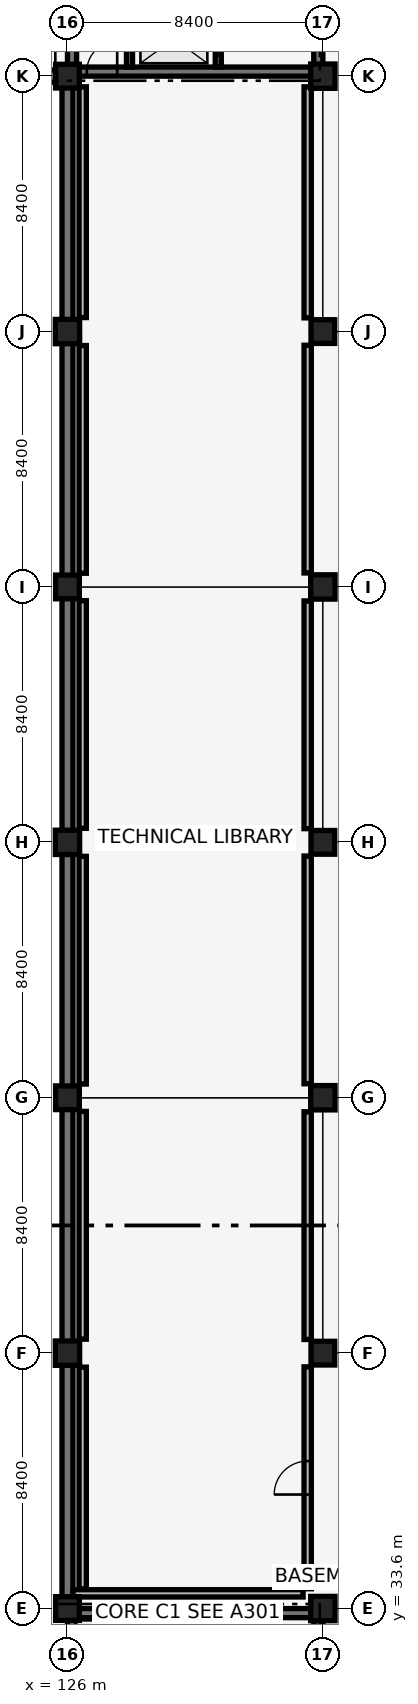
"""IFC4 building model, lengths in metres.
Left out: names, types, materials, properties, quantities, classifications, styles, units other than length and angle.
Written with IfcOpenShell. Run it as: python <this file> out.ifc"""

import sys

from ifc_helpers import new_model, si_unit, direction, frame, frame_2d, origin, origin_2d, place, context, subcontext, project, spatial, rectangle, extrude, element, fill, save


model = new_model("IFC4")
c1 = context("Model", 3, precision=1e-05, world=origin(), true_north=direction((0.0, 1.0)))
c2 = subcontext(c1, "Body", "Model", "MODEL_VIEW")
j1 = project(units=[si_unit("LENGTHUNIT", "METRE"), si_unit("PLANEANGLEUNIT", "RADIAN")], contexts=[c1])
p1 = place(None, origin())
s1 = spatial("IfcSite", under=j1, at=p1, CompositionType="ELEMENT")
p2 = place(p1, origin())
s2 = spatial("IfcBuilding", under=s1, at=p2, CompositionType="ELEMENT")
p3 = place(p2, frame((0.0, 0.0, -4.42)))
s3 = spatial("IfcBuildingStorey", under=s2, at=p3, CompositionType="ELEMENT", Elevation=-4.42)
p4 = place(p3, frame((117.95, 84.0, 0.0), z_axis=(0.0, 0.0, 1.0), x_axis=(1.0, 0.0, 0.0)))
e1 = element("IfcWall", 1, at=p4, inside=s3, PredefinedType="USERDEFINED", context=c2, shape_type="SweptSolid", body=[
    extrude(rectangle(XDim=7.7, YDim=0.4, at=frame_2d((3.85, 0.0))), origin(), (0.0, 0.0, 1.0), 4.12),
])
for number, where, z_axis, x_axis in (
    (2, (126.0, 33.95, 0.0), (0.0, 0.0, 1.0), (0.0, 1.0, 0.0)),
    (3, (126.0, 42.35, 0.0), (0.0, 0.0, 1.0), (0.0, 1.0, 0.0)),
    (4, (126.0, 50.75, 0.0), (0.0, 0.0, 1.0), (0.0, 1.0, 0.0)),
):
    element("IfcWall", number, at=place(p3, frame(where, z_axis=z_axis, x_axis=x_axis)), inside=s3, PredefinedType="USERDEFINED", context=c2, shape_type="SweptSolid", body=[
        extrude(rectangle(XDim=7.7, YDim=0.36, at=frame_2d((3.85, 0.0))), origin(), (0.0, 0.0, 1.0), 4.12),
    ])
p5 = place(p3, frame((126.0, 59.15, 0.0), z_axis=(0.0, 0.0, 1.0), x_axis=(0.0, 1.0, 0.0)))
e5 = element("IfcWall", 5, at=p5, inside=s3, PredefinedType="USERDEFINED", context=c2, shape_type="SweptSolid", body=[
    extrude(rectangle(XDim=7.7, YDim=0.36, at=frame_2d((3.85, 0.0))), origin(), (0.0, 0.0, 1.0), 4.12),
])
for number, where, z_axis, x_axis in (
    (6, (126.0, 67.55, 0.0), (0.0, 0.0, 1.0), (0.0, 1.0, 0.0)),
    (7, (126.0, 75.95, 0.0), (0.0, 0.0, 1.0), (0.0, 1.0, 0.0)),
):
    element("IfcWall", number, at=place(p3, frame(where, z_axis=z_axis, x_axis=x_axis)), inside=s3, PredefinedType="USERDEFINED", context=c2, shape_type="SweptSolid", body=[
        extrude(rectangle(XDim=7.7, YDim=0.36, at=frame_2d((3.85, 0.0))), origin(), (0.0, 0.0, 1.0), 4.12),
    ])
p6 = place(p3, frame((126.15, 33.45, 0.0), z_axis=(0.0, 0.0, 1.0), x_axis=(1.0, 0.0, 0.0)))
e8 = element("IfcWall", 8, at=p6, inside=s3, PredefinedType="SHEAR", context=c2, shape_type="SweptSolid", body=[
    extrude(rectangle(XDim=8.1, YDim=0.3, at=frame_2d((4.05, 0.0))), origin(), (0.0, 0.0, 1.0), 4.12),
])
p7 = place(p3, frame((126.15, 25.35, 0.0), z_axis=(0.0, 0.0, 1.0), x_axis=(0.0, 1.0, 0.0)))
e9 = element("IfcWall", 9, at=p7, inside=s3, PredefinedType="SHEAR", context=c2, shape_type="SweptSolid", body=[
    extrude(rectangle(XDim=8.1, YDim=0.3, at=frame_2d((4.05, 0.0))), origin(), (0.0, 0.0, 1.0), 4.12),
])
p8 = place(p3, frame((134.25, 25.35, 0.0), z_axis=(0.0, 0.0, 1.0), x_axis=(0.0, 1.0, 0.0)))
e10 = element("IfcWall", 10, at=p8, inside=s3, PredefinedType="SHEAR", context=c2, shape_type="SweptSolid", body=[
    extrude(rectangle(XDim=8.1, YDim=0.3, at=frame_2d((4.05, 0.0))), origin(), (0.0, 0.0, 1.0), 4.12),
])
p9 = place(p8, frame((1.325, 0.0, 0.0)))
e11 = element("IfcOpeningElement", 11, at=p9, cuts=e10, PredefinedType="OPENING", context=c2, shape_type="SweptSolid", body=[
    extrude(rectangle(XDim=1.45, YDim=2.15, at=frame_2d((0.725, 1.075))), frame((0.0, 0.16, 0.0), z_axis=(0.0, -1.0, 0.0), x_axis=(1.0, 0.0, 0.0)), (0.0, 0.0, 1.0), 0.32),
])
p10 = place(p3, frame((126.15, 84.15, 0.0), z_axis=(0.0, 0.0, 1.0), x_axis=(1.0, 0.0, 0.0)))
e12 = element("IfcWall", 12, at=p10, inside=s3, PredefinedType="SHEAR", context=c2, shape_type="SweptSolid", body=[
    extrude(rectangle(XDim=8.1, YDim=0.3, at=frame_2d((4.05, 0.0))), origin(), (0.0, 0.0, 1.0), 4.12),
])
p11 = place(p10, frame((0.485, 0.0, 0.0)))
e13 = element("IfcOpeningElement", 13, at=p11, cuts=e12, PredefinedType="OPENING", context=c2, shape_type="SweptSolid", body=[
    extrude(rectangle(XDim=1.0, YDim=2.15, at=frame_2d((0.5, 1.075))), frame((0.0, 0.16, 0.0), z_axis=(0.0, -1.0, 0.0), x_axis=(1.0, 0.0, 0.0)), (0.0, 0.0, 1.0), 0.32),
])
p12 = place(p3, frame((126.15, 84.15, 0.0), z_axis=(0.0, 0.0, 1.0), x_axis=(0.0, 1.0, 0.0)))
e14 = element("IfcWall", 14, at=p12, inside=s3, PredefinedType="SHEAR", context=c2, shape_type="SweptSolid", body=[
    extrude(rectangle(XDim=8.1, YDim=0.3, at=frame_2d((4.05, 0.0))), origin(), (0.0, 0.0, 1.0), 4.12),
])
p13 = place(p3, frame((134.25, 84.15, 0.0), z_axis=(0.0, 0.0, 1.0), x_axis=(0.0, 1.0, 0.0)))
e15 = element("IfcWall", 15, at=p13, inside=s3, PredefinedType="SHEAR", context=c2, shape_type="SweptSolid", body=[
    extrude(rectangle(XDim=8.1, YDim=0.3, at=frame_2d((4.05, 0.0))), origin(), (0.0, 0.0, 1.0), 4.12),
])
p14 = place(p13, frame((1.325, 0.0, 0.0)))
e16 = element("IfcOpeningElement", 16, at=p14, cuts=e15, PredefinedType="OPENING", context=c2, shape_type="SweptSolid", body=[
    extrude(rectangle(XDim=1.45, YDim=2.15, at=frame_2d((0.725, 1.075))), frame((0.0, 0.16, 0.0), z_axis=(0.0, -1.0, 0.0), x_axis=(1.0, 0.0, 0.0)), (0.0, 0.0, 1.0), 0.32),
])
p15 = place(p3, frame((126.0, 33.6, -0.4), z_axis=(0.0, 0.0, 1.0), x_axis=(1.0, 0.0, 0.0)))
e17 = element("IfcColumn", 17, at=p15, inside=s3, PredefinedType="COLUMN", context=c2, shape_type="SweptSolid", body=[
    extrude(rectangle(XDim=0.78, YDim=0.78, at=origin_2d()), origin(), (0.0, 0.0, 1.0), 4.52),
])
p16 = place(p3, frame((126.0, 42.0, -0.4), z_axis=(0.0, 0.0, 1.0), x_axis=(1.0, 0.0, 0.0)))
e18 = element("IfcColumn", 18, at=p16, inside=s3, PredefinedType="COLUMN", context=c2, shape_type="SweptSolid", body=[
    extrude(rectangle(XDim=0.8, YDim=0.8, at=origin_2d()), origin(), (0.0, 0.0, 1.0), 4.52),
])
p17 = place(p3, frame((126.0, 50.4, -0.4), z_axis=(0.0, 0.0, 1.0), x_axis=(1.0, 0.0, 0.0)))
e19 = element("IfcColumn", 19, at=p17, inside=s3, PredefinedType="COLUMN", context=c2, shape_type="SweptSolid", body=[
    extrude(rectangle(XDim=0.78, YDim=0.78, at=origin_2d()), origin(), (0.0, 0.0, 1.0), 4.52),
])
p18 = place(p3, frame((126.0, 58.8, -0.4), z_axis=(0.0, 0.0, 1.0), x_axis=(1.0, 0.0, 0.0)))
e20 = element("IfcColumn", 20, at=p18, inside=s3, PredefinedType="COLUMN", context=c2, shape_type="SweptSolid", body=[
    extrude(rectangle(XDim=0.8, YDim=0.8, at=origin_2d()), origin(), (0.0, 0.0, 1.0), 4.52),
])
p19 = place(p3, frame((126.0, 67.2, -0.4), z_axis=(0.0, 0.0, 1.0), x_axis=(1.0, 0.0, 0.0)))
e21 = element("IfcColumn", 21, at=p19, inside=s3, PredefinedType="COLUMN", context=c2, shape_type="SweptSolid", body=[
    extrude(rectangle(XDim=0.78, YDim=0.78, at=origin_2d()), origin(), (0.0, 0.0, 1.0), 4.52),
])
p20 = place(p3, frame((126.0, 75.6, -0.4), z_axis=(0.0, 0.0, 1.0), x_axis=(1.0, 0.0, 0.0)))
e22 = element("IfcColumn", 22, at=p20, inside=s3, PredefinedType="COLUMN", context=c2, shape_type="SweptSolid", body=[
    extrude(rectangle(XDim=0.8, YDim=0.8, at=origin_2d()), origin(), (0.0, 0.0, 1.0), 4.52),
])
p21 = place(p3, frame((126.0, 84.0, -0.4), z_axis=(0.0, 0.0, 1.0), x_axis=(1.0, 0.0, 0.0)))
e23 = element("IfcColumn", 23, at=p21, inside=s3, PredefinedType="COLUMN", context=c2, shape_type="SweptSolid", body=[
    extrude(rectangle(XDim=0.78, YDim=0.78, at=origin_2d()), origin(), (0.0, 0.0, 1.0), 4.52),
])
p22 = place(p3, frame((134.4, 33.6, -0.4), z_axis=(0.0, 0.0, 1.0), x_axis=(1.0, 0.0, 0.0)))
e24 = element("IfcColumn", 24, at=p22, inside=s3, PredefinedType="COLUMN", context=c2, shape_type="SweptSolid", body=[
    extrude(rectangle(XDim=0.8, YDim=0.8, at=origin_2d()), origin(), (0.0, 0.0, 1.0), 4.52),
])
p23 = place(p3, frame((134.4, 42.0, -0.4), z_axis=(0.0, 0.0, 1.0), x_axis=(1.0, 0.0, 0.0)))
e25 = element("IfcColumn", 25, at=p23, inside=s3, PredefinedType="COLUMN", context=c2, shape_type="SweptSolid", body=[
    extrude(rectangle(XDim=0.78, YDim=0.78, at=origin_2d()), origin(), (0.0, 0.0, 1.0), 4.52),
])
p24 = place(p3, frame((134.4, 50.4, -0.4), z_axis=(0.0, 0.0, 1.0), x_axis=(1.0, 0.0, 0.0)))
e26 = element("IfcColumn", 26, at=p24, inside=s3, PredefinedType="COLUMN", context=c2, shape_type="SweptSolid", body=[
    extrude(rectangle(XDim=0.8, YDim=0.8, at=origin_2d()), origin(), (0.0, 0.0, 1.0), 4.52),
])
p25 = place(p3, frame((134.4, 58.8, -0.4), z_axis=(0.0, 0.0, 1.0), x_axis=(1.0, 0.0, 0.0)))
e27 = element("IfcColumn", 27, at=p25, inside=s3, PredefinedType="COLUMN", context=c2, shape_type="SweptSolid", body=[
    extrude(rectangle(XDim=0.78, YDim=0.78, at=origin_2d()), origin(), (0.0, 0.0, 1.0), 4.52),
])
p26 = place(p3, frame((134.4, 67.2, -0.4), z_axis=(0.0, 0.0, 1.0), x_axis=(1.0, 0.0, 0.0)))
e28 = element("IfcColumn", 28, at=p26, inside=s3, PredefinedType="COLUMN", context=c2, shape_type="SweptSolid", body=[
    extrude(rectangle(XDim=0.8, YDim=0.8, at=origin_2d()), origin(), (0.0, 0.0, 1.0), 4.52),
])
p27 = place(p3, frame((134.4, 75.6, -0.4), z_axis=(0.0, 0.0, 1.0), x_axis=(1.0, 0.0, 0.0)))
e29 = element("IfcColumn", 29, at=p27, inside=s3, PredefinedType="COLUMN", context=c2, shape_type="SweptSolid", body=[
    extrude(rectangle(XDim=0.78, YDim=0.78, at=origin_2d()), origin(), (0.0, 0.0, 1.0), 4.52),
])
p28 = place(p3, frame((134.4, 84.0, -0.4), z_axis=(0.0, 0.0, 1.0), x_axis=(1.0, 0.0, 0.0)))
e30 = element("IfcColumn", 30, at=p28, inside=s3, PredefinedType="COLUMN", context=c2, shape_type="SweptSolid", body=[
    extrude(rectangle(XDim=0.8, YDim=0.8, at=origin_2d()), origin(), (0.0, 0.0, 1.0), 4.52),
])
p29 = place(p3, frame((130.96, 84.3, 0.0), z_axis=(0.0, 0.0, 1.0), x_axis=(0.0, 1.0, 0.0)))
e31 = element("IfcWall", 31, at=p29, inside=s3, PredefinedType="SHEAR", context=c2, shape_type="SweptSolid", body=[
    extrude(rectangle(XDim=3.8, YDim=0.2, at=frame_2d((1.9, 0.0))), origin(), (0.0, 0.0, 1.0), 3.17),
])
p30 = place(p29, frame((0.375, 0.0, 0.0)))
e32 = element("IfcOpeningElement", 32, at=p30, cuts=e31, PredefinedType="OPENING", context=c2, shape_type="SweptSolid", body=[
    extrude(rectangle(XDim=1.1, YDim=2.15, at=frame_2d((0.55, 1.075))), frame((0.0, 0.11, 0.0), z_axis=(0.0, -1.0, 0.0), x_axis=(1.0, 0.0, 0.0)), (0.0, 0.0, 1.0), 0.22),
])
p31 = place(p29, frame((2.175, 0.0, 0.0)))
e33 = element("IfcOpeningElement", 33, at=p31, cuts=e31, PredefinedType="OPENING", context=c2, shape_type="SweptSolid", body=[
    extrude(rectangle(XDim=1.4, YDim=2.2, at=frame_2d((0.7, 1.1))), frame((0.0, 0.11, 0.0), z_axis=(0.0, -1.0, 0.0), x_axis=(1.0, 0.0, 0.0)), (0.0, 0.0, 1.0), 0.22),
])
p32 = place(p3, frame((128.04, 84.3, 0.0), z_axis=(0.0, 0.0, 1.0), x_axis=(0.0, 1.0, 0.0)))
e34 = element("IfcWall", 34, at=p32, inside=s3, PredefinedType="SHEAR", context=c2, shape_type="SweptSolid", body=[
    extrude(rectangle(XDim=3.8, YDim=0.2, at=frame_2d((1.9, 0.0))), origin(), (0.0, 0.0, 1.0), 3.17),
])
p33 = place(p3, frame((133.9, 34.25, 0.0), z_axis=(0.0, 0.0, 1.0), x_axis=(0.0, 1.0, 0.0)))
e35 = element("IfcWall", 35, at=p33, inside=s3, PredefinedType="PARTITIONING", context=c2, shape_type="SweptSolid", body=[
    extrude(rectangle(XDim=7.3, YDim=0.24, at=frame_2d((3.65, 0.0))), origin(), (0.0, 0.0, 1.0), 3.56),
])
p34 = place(p33, frame((3.1, 0.0, 0.0)))
e36 = element("IfcOpeningElement", 36, at=p34, cuts=e35, PredefinedType="OPENING", context=c2, shape_type="SweptSolid", body=[
    extrude(rectangle(XDim=1.1, YDim=2.15, at=frame_2d((0.55, 1.075))), frame((0.0, 0.13, 0.0), z_axis=(0.0, -1.0, 0.0), x_axis=(1.0, 0.0, 0.0)), (0.0, 0.0, 1.0), 0.26),
])
p35 = place(p3, frame((133.9, 42.45, 0.0), z_axis=(0.0, 0.0, 1.0), x_axis=(0.0, 1.0, 0.0)))
e37 = element("IfcWall", 37, at=p35, inside=s3, PredefinedType="PARTITIONING", context=c2, shape_type="SweptSolid", body=[
    extrude(rectangle(XDim=7.49, YDim=0.24, at=frame_2d((3.745, 0.0))), origin(), (0.0, 0.0, 1.0), 3.57),
])
p36 = place(p3, frame((133.9, 50.86, 0.0), z_axis=(0.0, 0.0, 1.0), x_axis=(0.0, 1.0, 0.0)))
e38 = element("IfcWall", 38, at=p36, inside=s3, PredefinedType="PARTITIONING", context=c2, shape_type="SweptSolid", body=[
    extrude(rectangle(XDim=7.49, YDim=0.24, at=frame_2d((3.745, 0.0))), origin(), (0.0, 0.0, 1.0), 3.56),
])
p37 = place(p3, frame((133.9, 59.25, 0.0), z_axis=(0.0, 0.0, 1.0), x_axis=(0.0, 1.0, 0.0)))
e39 = element("IfcWall", 39, at=p37, inside=s3, PredefinedType="PARTITIONING", context=c2, shape_type="SweptSolid", body=[
    extrude(rectangle(XDim=7.49, YDim=0.24, at=frame_2d((3.745, 0.0))), origin(), (0.0, 0.0, 1.0), 3.57),
])
p38 = place(p3, frame((133.9, 67.66, 0.0), z_axis=(0.0, 0.0, 1.0), x_axis=(0.0, 1.0, 0.0)))
e40 = element("IfcWall", 40, at=p38, inside=s3, PredefinedType="PARTITIONING", context=c2, shape_type="SweptSolid", body=[
    extrude(rectangle(XDim=7.49, YDim=0.24, at=frame_2d((3.745, 0.0))), origin(), (0.0, 0.0, 1.0), 3.56),
])
p39 = place(p3, frame((133.9, 76.05, 0.0), z_axis=(0.0, 0.0, 1.0), x_axis=(0.0, 1.0, 0.0)))
e41 = element("IfcWall", 41, at=p39, inside=s3, PredefinedType="PARTITIONING", context=c2, shape_type="SweptSolid", body=[
    extrude(rectangle(XDim=7.6, YDim=0.24, at=frame_2d((3.8, 0.0))), origin(), (0.0, 0.0, 1.0), 3.17),
])
p40 = place(p3, frame((126.18, 34.1, 0.0), z_axis=(0.0, 0.0, 1.0), x_axis=(1.0, 0.0, 0.0)))
e42 = element("IfcWall", 42, at=p40, inside=s3, PredefinedType="PARTITIONING", context=c2, shape_type="SweptSolid", body=[
    extrude(rectangle(XDim=7.57, YDim=0.24, at=frame_2d((3.785, 0.0))), origin(), (0.0, 0.0, 1.0), 3.35),
])
p41 = place(p3, frame((126.5, 34.25, 0.0), z_axis=(0.0, 0.0, 1.0), x_axis=(0.0, 1.0, 0.0)))
e43 = element("IfcWall", 43, at=p41, inside=s3, PredefinedType="PARTITIONING", context=c2, shape_type="SweptSolid", body=[
    extrude(rectangle(XDim=7.29, YDim=0.24, at=frame_2d((3.645, 0.0))), origin(), (0.0, 0.0, 1.0), 3.56),
])
p42 = place(p3, frame((126.5, 42.46, 0.0), z_axis=(0.0, 0.0, 1.0), x_axis=(0.0, 1.0, 0.0)))
e44 = element("IfcWall", 44, at=p42, inside=s3, PredefinedType="PARTITIONING", context=c2, shape_type="SweptSolid", body=[
    extrude(rectangle(XDim=7.49, YDim=0.24, at=frame_2d((3.745, 0.0))), origin(), (0.0, 0.0, 1.0), 3.57),
])
p43 = place(p3, frame((126.5, 50.85, 0.0), z_axis=(0.0, 0.0, 1.0), x_axis=(0.0, 1.0, 0.0)))
e45 = element("IfcWall", 45, at=p43, inside=s3, PredefinedType="PARTITIONING", context=c2, shape_type="SweptSolid", body=[
    extrude(rectangle(XDim=7.49, YDim=0.24, at=frame_2d((3.745, 0.0))), origin(), (0.0, 0.0, 1.0), 3.56),
])
p44 = place(p3, frame((126.5, 59.26, 0.0), z_axis=(0.0, 0.0, 1.0), x_axis=(0.0, 1.0, 0.0)))
e46 = element("IfcWall", 46, at=p44, inside=s3, PredefinedType="PARTITIONING", context=c2, shape_type="SweptSolid", body=[
    extrude(rectangle(XDim=7.49, YDim=0.24, at=frame_2d((3.745, 0.0))), origin(), (0.0, 0.0, 1.0), 3.57),
])
p45 = place(p3, frame((126.5, 67.65, 0.0), z_axis=(0.0, 0.0, 1.0), x_axis=(0.0, 1.0, 0.0)))
e47 = element("IfcWall", 47, at=p45, inside=s3, PredefinedType="PARTITIONING", context=c2, shape_type="SweptSolid", body=[
    extrude(rectangle(XDim=7.49, YDim=0.24, at=frame_2d((3.745, 0.0))), origin(), (0.0, 0.0, 1.0), 3.56),
])
p46 = place(p3, frame((126.5, 76.06, 0.0), z_axis=(0.0, 0.0, 1.0), x_axis=(0.0, 1.0, 0.0)))
e48 = element("IfcWall", 48, at=p46, inside=s3, PredefinedType="PARTITIONING", context=c2, shape_type="SweptSolid", body=[
    extrude(rectangle(XDim=7.59, YDim=0.24, at=frame_2d((3.795, 0.0))), origin(), (0.0, 0.0, 1.0), 3.17),
])
p47 = place(p30, origin())
e49 = element("IfcDoor", 49, at=p47, inside=s3, OperationType="SLIDING_TO_LEFT", PredefinedType="DOOR", context=c2, shape_type="SweptSolid", body=[
    extrude(rectangle(XDim=1.1, YDim=2.15, at=frame_2d((0.55, 1.075))), frame((0.0, 0.025, 0.0), z_axis=(0.0, -1.0, 0.0), x_axis=(1.0, 0.0, 0.0)), (0.0, 0.0, 1.0), 0.05),
])
fill(e32, e49)
p48 = place(p11, origin())
e50 = element("IfcDoor", 50, at=p48, inside=s3, OperationType="SINGLE_SWING_RIGHT", PredefinedType="DOOR", context=c2, shape_type="SweptSolid", body=[
    extrude(rectangle(XDim=1.0, YDim=2.15, at=frame_2d((0.5, 1.075))), frame((0.0, 0.025, 0.0), z_axis=(0.0, -1.0, 0.0), x_axis=(1.0, 0.0, 0.0)), (0.0, 0.0, 1.0), 0.05),
])
fill(e13, e50)
p49 = place(p34, origin())
e51 = element("IfcDoor", 51, at=p49, inside=s3, OperationType="SINGLE_SWING_LEFT", PredefinedType="DOOR", context=c2, shape_type="SweptSolid", body=[
    extrude(rectangle(XDim=1.1, YDim=2.15, at=frame_2d((0.55, 1.075))), frame((0.0, 0.025, 0.0), z_axis=(0.0, -1.0, 0.0), x_axis=(1.0, 0.0, 0.0)), (0.0, 0.0, 1.0), 0.05),
])
fill(e36, e51)
save(model, sys.argv[1])
